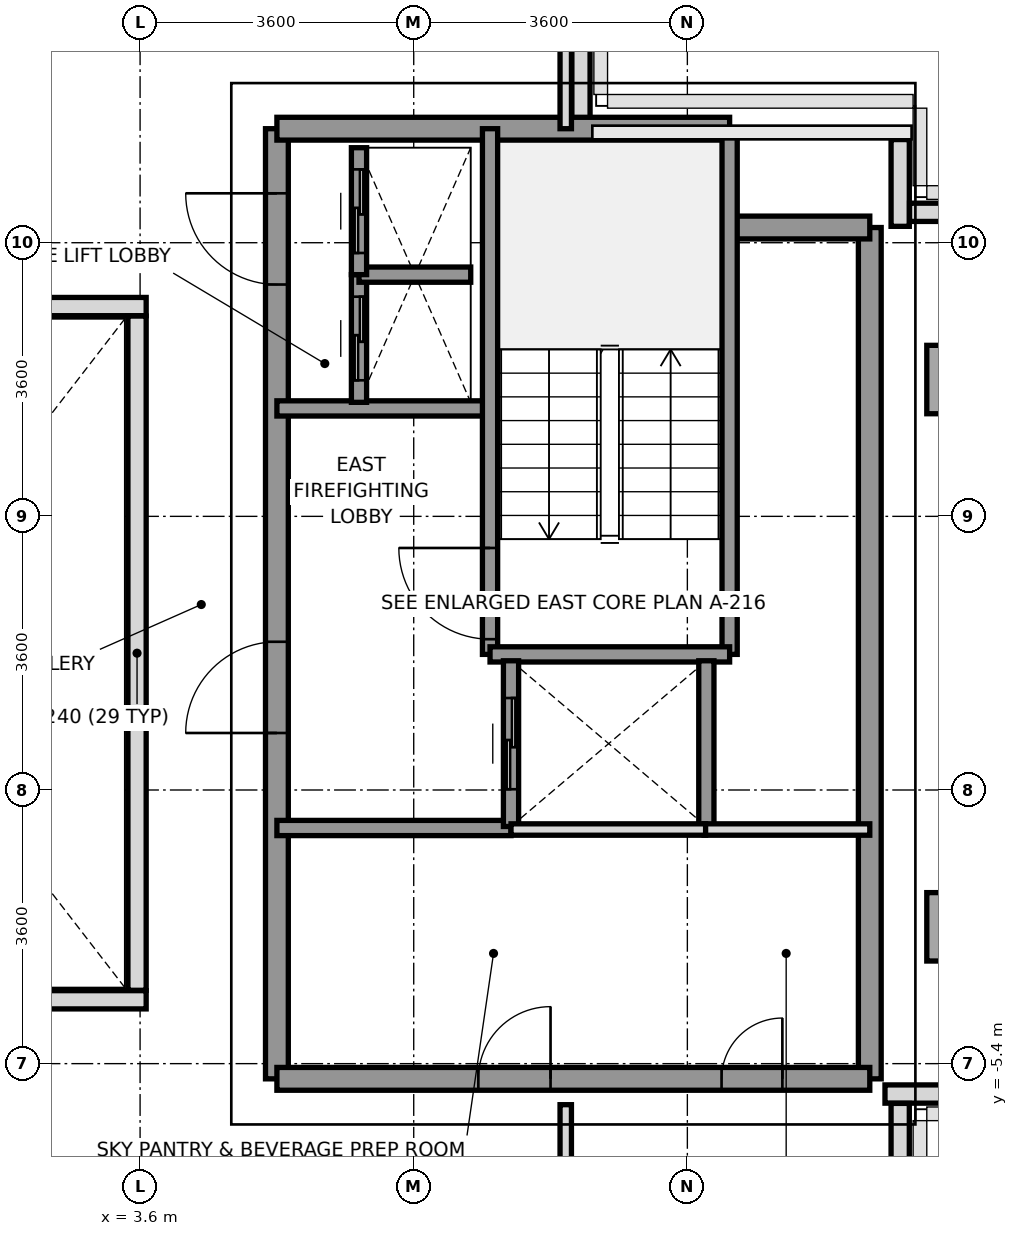
"""IFC4 building model, lengths in metres.
Left out: names, types, materials, properties, quantities, classifications, styles, units other than length and angle.
Written with IfcOpenShell. Run it as: python <this file> out.ifc"""

import sys

from ifc_helpers import new_model, si_unit, direction, frame, frame_2d, origin, origin_2d, place, context, subcontext, project, spatial, rectangle, extrude, source, transform, mapped, element, fill, save


model = new_model("IFC4")
c1 = context("Model", 3, precision=1e-05, world=origin(), true_north=direction((0.0, 1.0)))
c2 = subcontext(c1, "Body", "Model", "MODEL_VIEW")
j1 = project(units=[si_unit("LENGTHUNIT", "METRE"), si_unit("PLANEANGLEUNIT", "RADIAN")], contexts=[c1])
p1 = place(None, origin())
s1 = spatial("IfcSite", under=j1, at=p1, CompositionType="ELEMENT")
p2 = place(p1, origin())
s2 = spatial("IfcBuilding", under=s1, at=p2, CompositionType="ELEMENT")
p3 = place(p2, frame((0.0, 0.0, 255.6)))
s3 = spatial("IfcBuildingStorey", under=s2, at=p3, CompositionType="ELEMENT", Elevation=255.6)
m1 = source(origin(), c2, "Body", "SweptSolid", [
    extrude(rectangle(XDim=0.9, YDim=0.9, at=origin_2d()), origin(), (0.0, 0.0, 1.0), 3.01),
])
for number, where, z_axis, x_axis in (
    (1, (14.4, -3.6, 0.0), (0.0, 0.0, 1.0), (1.0, 0.0, 0.0)),
    (2, (14.4, 3.6, 0.0), (0.0, 0.0, 1.0), (1.0, 0.0, 0.0)),
):
    element("IfcColumn", number, at=place(p3, frame(where, z_axis=z_axis, x_axis=x_axis)), inside=s3, PredefinedType="COLUMN", context=c2, shape_type="MappedRepresentation", body=[
        mapped(m1, transform((0.0, 0.0, 0.0), x_axis=(1.0, 0.0, 0.0), y_axis=(0.0, 1.0, 0.0), z_axis=(0.0, 0.0, 1.0), scale=1.0)),
    ])
p4 = place(p3, frame((14.677, -5.8, 0.0), z_axis=(0.0, 0.0, 1.0), x_axis=(-1.0, 0.0, 0.0)))
e3 = element("IfcWall", 3, at=p4, inside=s3, PredefinedType="PARAPET", context=c2, shape_type="SweptSolid", body=[
    extrude(rectangle(XDim=1.277, YDim=0.24, at=frame_2d((0.639, 0.0))), origin(), (0.0, 0.0, 1.0), 1.15),
])
p5 = place(p3, frame((13.6, -5.923, 0.0), z_axis=(0.0, 0.0, 1.0), x_axis=(0.0, -1.0, 0.0)))
e4 = element("IfcWall", 4, at=p5, inside=s3, PredefinedType="PARAPET", context=c2, shape_type="SweptSolid", body=[
    extrude(rectangle(XDim=0.834, YDim=0.24, at=frame_2d((0.417, 0.0))), origin(), (0.0, 0.0, 1.0), 1.15),
])
p6 = place(p3, frame((9.4, 8.622, 0.0), z_axis=(0.0, 0.0, 1.0), x_axis=(0.0, -1.0, 0.0)))
e5 = element("IfcWall", 5, at=p6, inside=s3, PredefinedType="PARAPET", context=c2, shape_type="SweptSolid", body=[
    extrude(rectangle(XDim=1.669, YDim=0.24, at=frame_2d((0.834, 0.0))), origin(), (0.0, 0.0, 1.0), 1.15),
])
p7 = place(p3, frame((13.6, 6.757, 0.0), z_axis=(0.0, 0.0, 1.0), x_axis=(0.0, -1.0, 0.0)))
e6 = element("IfcWall", 6, at=p7, inside=s3, PredefinedType="PARAPET", context=c2, shape_type="SweptSolid", body=[
    extrude(rectangle(XDim=1.142, YDim=0.24, at=frame_2d((0.571, 0.0))), origin(), (0.0, 0.0, 1.0), 1.15),
])
p8 = place(p3, frame((13.723, 5.8, 0.0), z_axis=(0.0, 0.0, 1.0), x_axis=(1.0, 0.0, 0.0)))
e7 = element("IfcWall", 7, at=p8, inside=s3, PredefinedType="PARAPET", context=c2, shape_type="SweptSolid", body=[
    extrude(rectangle(XDim=1.077, YDim=0.24, at=frame_2d((0.539, 0.0))), origin(), (0.0, 0.0, 1.0), 1.15),
])
p9 = place(p3, frame((13.2, -5.6, 0.0), z_axis=(0.0, 0.0, 1.0), x_axis=(0.0, 1.0, 0.0)))
e8 = element("IfcWall", 8, at=p9, inside=s3, PredefinedType="SHEAR", context=c2, shape_type="SweptSolid", body=[
    extrude(rectangle(XDim=11.2, YDim=0.3, at=frame_2d((5.6, 0.0))), origin(), (0.0, 0.0, 1.0), 3.01),
])
p10 = place(p3, frame((5.4, -5.6, 0.0), z_axis=(0.0, 0.0, 1.0), x_axis=(0.0, 1.0, 0.0)))
e9 = element("IfcWall", 9, at=p10, inside=s3, PredefinedType="SHEAR", context=c2, shape_type="SweptSolid", body=[
    extrude(rectangle(XDim=12.5, YDim=0.3, at=frame_2d((6.25, 0.0))), origin(), (0.0, 0.0, 1.0), 3.01),
])
p11 = place(p10, frame((4.55, 0.0, 0.0)))
e10 = element("IfcOpeningElement", 10, at=p11, cuts=e9, PredefinedType="OPENING", context=c2, shape_type="SweptSolid", body=[
    extrude(rectangle(XDim=1.2, YDim=2.2, at=frame_2d((0.6, 1.1))), frame((0.0, 0.16, 0.0), z_axis=(0.0, -1.0, 0.0), x_axis=(1.0, 0.0, 0.0)), (0.0, 0.0, 1.0), 0.32),
])
p12 = place(p10, frame((10.45, 0.0, 0.0)))
e11 = element("IfcOpeningElement", 11, at=p12, cuts=e9, PredefinedType="OPENING", context=c2, shape_type="SweptSolid", body=[
    extrude(rectangle(XDim=1.2, YDim=2.2, at=frame_2d((0.6, 1.1))), frame((0.0, 0.16, 0.0), z_axis=(0.0, -1.0, 0.0), x_axis=(1.0, 0.0, 0.0)), (0.0, 0.0, 1.0), 0.32),
])
p13 = place(p3, frame((5.4, 6.9, 0.0), z_axis=(0.0, 0.0, 1.0), x_axis=(1.0, 0.0, 0.0)))
e12 = element("IfcWall", 12, at=p13, inside=s3, PredefinedType="SHEAR", context=c2, shape_type="SweptSolid", body=[
    extrude(rectangle(XDim=5.956, YDim=0.3, at=frame_2d((2.978, 0.0))), origin(), (0.0, 0.0, 1.0), 3.01),
])
p14 = place(p3, frame((11.356, 5.6, 0.0), z_axis=(0.0, 0.0, 1.0), x_axis=(1.0, 0.0, 0.0)))
e13 = element("IfcWall", 13, at=p14, inside=s3, PredefinedType="SHEAR", context=c2, shape_type="SweptSolid", body=[
    extrude(rectangle(XDim=1.844, YDim=0.3, at=frame_2d((0.922, 0.0))), origin(), (0.0, 0.0, 1.0), 3.01),
])
p15 = place(p3, frame((5.4, -5.6, 0.0), z_axis=(0.0, 0.0, 1.0), x_axis=(1.0, 0.0, 0.0)))
e14 = element("IfcWall", 14, at=p15, inside=s3, PredefinedType="SHEAR", context=c2, shape_type="SweptSolid", body=[
    extrude(rectangle(XDim=7.8, YDim=0.3, at=frame_2d((3.9, 0.0))), origin(), (0.0, 0.0, 1.0), 3.01),
])
p16 = place(p15, frame((5.85, 0.0, 0.0)))
e15 = element("IfcOpeningElement", 15, at=p16, cuts=e14, PredefinedType="OPENING", context=c2, shape_type="SweptSolid", body=[
    extrude(rectangle(XDim=0.8, YDim=2.1, at=frame_2d((0.4, 1.05))), frame((0.0, 0.16, 0.0), z_axis=(0.0, -1.0, 0.0), x_axis=(1.0, 0.0, 0.0)), (0.0, 0.0, 1.0), 0.32),
])
p17 = place(p15, frame((2.65, 0.0, 0.0)))
e16 = element("IfcOpeningElement", 16, at=p17, cuts=e14, PredefinedType="OPENING", context=c2, shape_type="SweptSolid", body=[
    extrude(rectangle(XDim=0.95, YDim=2.15, at=frame_2d((0.475, 1.075))), frame((0.0, 0.16, 0.0), z_axis=(0.0, -1.0, 0.0), x_axis=(1.0, 0.0, 0.0)), (0.0, 0.0, 1.0), 0.32),
])
p18 = place(p3, frame((5.4, 3.22, 0.0), z_axis=(0.0, 0.0, 1.0), x_axis=(1.0, 0.0, 0.0)))
e17 = element("IfcWall", 17, at=p18, inside=s3, PredefinedType="SOLIDWALL", context=c2, shape_type="SweptSolid", body=[
    extrude(rectangle(XDim=2.78, YDim=0.2, at=frame_2d((1.39, 0.0))), origin(), (0.0, 0.0, 1.0), 3.01),
])
p19 = place(p3, frame((5.4, -2.3, 0.0), z_axis=(0.0, 0.0, 1.0), x_axis=(1.0, 0.0, 0.0)))
e18 = element("IfcWall", 18, at=p19, inside=s3, PredefinedType="SOLIDWALL", context=c2, shape_type="SweptSolid", body=[
    extrude(rectangle(XDim=3.08, YDim=0.2, at=frame_2d((1.54, 0.0))), origin(), (0.0, 0.0, 1.0), 3.01),
])
p20 = place(p3, frame((8.204, -0.016, 0.0), z_axis=(0.0, 0.0, 1.0), x_axis=(0.0, 1.0, 0.0)))
e19 = element("IfcWall", 19, at=p20, inside=s3, PredefinedType="SOLIDWALL", context=c2, shape_type="SweptSolid", body=[
    extrude(rectangle(XDim=6.916, YDim=0.2, at=frame_2d((3.458, 0.0))), origin(), (0.0, 0.0, 1.0), 3.01),
])
p21 = place(p20, frame((0.2, 0.0, 0.0)))
e20 = element("IfcOpeningElement", 20, at=p21, cuts=e19, PredefinedType="OPENING", context=c2, shape_type="SweptSolid", body=[
    extrude(rectangle(XDim=1.2, YDim=2.2, at=frame_2d((0.6, 1.1))), frame((0.0, 0.11, 0.0), z_axis=(0.0, -1.0, 0.0), x_axis=(1.0, 0.0, 0.0)), (0.0, 0.0, 1.0), 0.22),
])
p22 = place(p3, frame((11.356, -0.016, 0.0), z_axis=(0.0, 0.0, 1.0), x_axis=(0.0, 1.0, 0.0)))
e21 = element("IfcWall", 21, at=p22, inside=s3, PredefinedType="SOLIDWALL", context=c2, shape_type="SweptSolid", body=[
    extrude(rectangle(XDim=6.916, YDim=0.2, at=frame_2d((3.458, 0.0))), origin(), (0.0, 0.0, 1.0), 3.01),
])
p23 = place(p3, frame((8.204, -0.016, 0.0), z_axis=(0.0, 0.0, 1.0), x_axis=(1.0, 0.0, 0.0)))
e22 = element("IfcWall", 22, at=p23, inside=s3, PredefinedType="SOLIDWALL", context=c2, shape_type="SweptSolid", body=[
    extrude(rectangle(XDim=3.152, YDim=0.2, at=frame_2d((1.576, 0.0))), origin(), (0.0, 0.0, 1.0), 3.01),
])
p24 = place(p3, frame((8.48, -2.28, 0.0), z_axis=(0.0, 0.0, 1.0), x_axis=(0.0, 1.0, 0.0)))
e23 = element("IfcWall", 23, at=p24, inside=s3, PredefinedType="SOLIDWALL", context=c2, shape_type="SweptSolid", body=[
    extrude(rectangle(XDim=2.18, YDim=0.2, at=frame_2d((1.09, 0.0))), origin(), (0.0, 0.0, 1.0), 3.01),
])
p25 = place(p24, frame((0.49, 0.0, 0.0)))
e24 = element("IfcOpeningElement", 24, at=p25, cuts=e23, PredefinedType="OPENING", context=c2, shape_type="SweptSolid", body=[
    extrude(rectangle(XDim=1.2, YDim=2.2, at=frame_2d((0.6, 1.1))), frame((0.0, 0.11, 0.0), z_axis=(0.0, -1.0, 0.0), x_axis=(1.0, 0.0, 0.0)), (0.0, 0.0, 1.0), 0.22),
])
p26 = place(p3, frame((11.05, -2.28, 0.0), z_axis=(0.0, 0.0, 1.0), x_axis=(0.0, 1.0, 0.0)))
e25 = element("IfcWall", 25, at=p26, inside=s3, PredefinedType="SOLIDWALL", context=c2, shape_type="SweptSolid", body=[
    extrude(rectangle(XDim=2.18, YDim=0.2, at=frame_2d((1.09, 0.0))), origin(), (0.0, 0.0, 1.0), 3.01),
])
p27 = place(p3, frame((6.48, 3.3, 0.0), z_axis=(0.0, 0.0, 1.0), x_axis=(0.0, 1.0, 0.0)))
e26 = element("IfcWall", 26, at=p27, inside=s3, PredefinedType="SOLIDWALL", context=c2, shape_type="SweptSolid", body=[
    extrude(rectangle(XDim=1.68, YDim=0.2, at=frame_2d((0.84, 0.0))), origin(), (0.0, 0.0, 1.0), 3.01),
])
p28 = place(p27, frame((0.29, 0.0, 0.0)))
e27 = element("IfcOpeningElement", 27, at=p28, cuts=e26, PredefinedType="OPENING", context=c2, shape_type="SweptSolid", body=[
    extrude(rectangle(XDim=1.1, YDim=2.2, at=frame_2d((0.55, 1.1))), frame((0.0, 0.11, 0.0), z_axis=(0.0, -1.0, 0.0), x_axis=(1.0, 0.0, 0.0)), (0.0, 0.0, 1.0), 0.22),
])
p29 = place(p3, frame((6.48, 4.98, 0.0), z_axis=(0.0, 0.0, 1.0), x_axis=(1.0, 0.0, 0.0)))
e28 = element("IfcWall", 28, at=p29, inside=s3, PredefinedType="SOLIDWALL", context=c2, shape_type="SweptSolid", body=[
    extrude(rectangle(XDim=1.47, YDim=0.2, at=frame_2d((0.735, 0.0))), origin(), (0.0, 0.0, 1.0), 3.01),
])
p30 = place(p3, frame((6.48, 4.98, 0.0), z_axis=(0.0, 0.0, 1.0), x_axis=(0.0, 1.0, 0.0)))
e29 = element("IfcWall", 29, at=p30, inside=s3, PredefinedType="SOLIDWALL", context=c2, shape_type="SweptSolid", body=[
    extrude(rectangle(XDim=1.67, YDim=0.2, at=frame_2d((0.835, 0.0))), origin(), (0.0, 0.0, 1.0), 3.01),
])
p31 = place(p30, frame((0.285, 0.0, 0.0)))
e30 = element("IfcOpeningElement", 30, at=p31, cuts=e29, PredefinedType="OPENING", context=c2, shape_type="SweptSolid", body=[
    extrude(rectangle(XDim=1.1, YDim=2.2, at=frame_2d((0.55, 1.1))), frame((0.0, 0.11, 0.0), z_axis=(0.0, -1.0, 0.0), x_axis=(1.0, 0.0, 0.0)), (0.0, 0.0, 1.0), 0.22),
])
p32 = place(p3, frame((11.02, -2.32, 0.0), z_axis=(0.0, 0.0, 1.0), x_axis=(1.0, 0.0, 0.0)))
e31 = element("IfcWall", 31, at=p32, inside=s3, PredefinedType="PARTITIONING", context=c2, shape_type="SweptSolid", body=[
    extrude(rectangle(XDim=2.18, YDim=0.15, at=frame_2d((1.09, 0.0))), origin(), (0.0, 0.0, 1.0), 3.01),
])
p33 = place(p3, frame((8.48, -2.32, 0.0), z_axis=(0.0, 0.0, 1.0), x_axis=(1.0, 0.0, 0.0)))
e32 = element("IfcWall", 32, at=p33, inside=s3, PredefinedType="PARTITIONING", context=c2, shape_type="SweptSolid", body=[
    extrude(rectangle(XDim=2.56, YDim=0.15, at=frame_2d((1.28, 0.0))), origin(), (0.0, 0.0, 1.0), 3.01),
])
p34 = place(p3, frame((9.2, 6.9, 0.0), z_axis=(0.0, 0.0, 1.0), x_axis=(0.0, 1.0, 0.0)))
e33 = element("IfcWall", 33, at=p34, inside=s3, PredefinedType="PARTITIONING", context=c2, shape_type="SweptSolid", body=[
    extrude(rectangle(XDim=3.38, YDim=0.15, at=frame_2d((1.69, 0.0))), origin(), (0.0, 0.0, 1.0), 2.61),
])
p35 = place(p3, frame((9.2, -10.28, 0.0), z_axis=(0.0, 0.0, 1.0), x_axis=(0.0, 1.0, 0.0)))
e34 = element("IfcWall", 34, at=p35, inside=s3, PredefinedType="PARTITIONING", context=c2, shape_type="SweptSolid", body=[
    extrude(rectangle(XDim=4.34, YDim=0.15, at=frame_2d((2.17, 0.0))), origin(), (0.0, 0.0, 1.0), 2.61),
])
for number, where, z_axis, x_axis in (
    (35, (-3.68, -4.56, 0.0), (0.0, 0.0, 1.0), (1.0, 0.0, 0.0)),
    (36, (-3.68, 4.56, 0.0), (0.0, 0.0, 1.0), (1.0, 0.0, 0.0)),
):
    element("IfcWall", number, at=place(p3, frame(where, z_axis=z_axis, x_axis=x_axis)), inside=s3, PredefinedType="PARAPET", context=c2, shape_type="SweptSolid", body=[
        extrude(rectangle(XDim=7.36, YDim=0.24, at=frame_2d((3.68, 0.0))), origin(), (0.0, 0.0, 1.0), 1.15),
    ])
p36 = place(p3, frame((3.56, -4.435, 0.0), z_axis=(0.0, 0.0, 1.0), x_axis=(0.0, 1.0, 0.0)))
e37 = element("IfcWall", 37, at=p36, inside=s3, PredefinedType="PARAPET", context=c2, shape_type="SweptSolid", body=[
    extrude(rectangle(XDim=8.87, YDim=0.24, at=frame_2d((4.435, 0.0))), origin(), (0.0, 0.0, 1.0), 1.15),
])
m2 = source(origin(), c2, "Body", "SweptSolid", [
    extrude(rectangle(XDim=1.2, YDim=2.2, at=frame_2d((0.6, 1.1))), frame((0.0, 0.025, 0.0), z_axis=(0.0, -1.0, 0.0), x_axis=(1.0, 0.0, 0.0)), (0.0, 0.0, 1.0), 0.05),
])
p37 = place(p21, origin())
e38 = element("IfcDoor", 38, at=p37, inside=s3, OperationType="SINGLE_SWING_RIGHT", PredefinedType="DOOR", context=c2, shape_type="MappedRepresentation", body=[
    mapped(m2, transform((0.0, 0.0, 0.0), x_axis=(1.0, 0.0, 0.0), y_axis=(0.0, 1.0, 0.0), z_axis=(0.0, 0.0, 1.0), scale=1.0)),
])
fill(e20, e38)
p38 = place(p11, origin())
e39 = element("IfcDoor", 39, at=p38, inside=s3, OperationType="SINGLE_SWING_LEFT", PredefinedType="DOOR", context=c2, shape_type="MappedRepresentation", body=[
    mapped(m2, transform((0.0, 0.0, 0.0), x_axis=(1.0, 0.0, 0.0), y_axis=(0.0, 1.0, 0.0), z_axis=(0.0, 0.0, 1.0), scale=1.0)),
])
fill(e10, e39)
p39 = place(p12, origin())
e40 = element("IfcDoor", 40, at=p39, inside=s3, OperationType="SINGLE_SWING_RIGHT", PredefinedType="DOOR", context=c2, shape_type="MappedRepresentation", body=[
    mapped(m2, transform((0.0, 0.0, 0.0), x_axis=(1.0, 0.0, 0.0), y_axis=(0.0, 1.0, 0.0), z_axis=(0.0, 0.0, 1.0), scale=1.0)),
])
fill(e11, e40)
m3 = source(origin(), c2, "Body", "SweptSolid", [
    extrude(rectangle(XDim=0.8, YDim=2.1, at=frame_2d((0.4, 1.05))), frame((0.0, 0.025, 0.0), z_axis=(0.0, -1.0, 0.0), x_axis=(1.0, 0.0, 0.0)), (0.0, 0.0, 1.0), 0.05),
])
p40 = place(p16, origin())
e41 = element("IfcDoor", 41, at=p40, inside=s3, OperationType="SINGLE_SWING_RIGHT", PredefinedType="DOOR", context=c2, shape_type="MappedRepresentation", body=[
    mapped(m3, transform((0.0, 0.0, 0.0), x_axis=(1.0, 0.0, 0.0), y_axis=(0.0, 1.0, 0.0), z_axis=(0.0, 0.0, 1.0), scale=1.0)),
])
fill(e15, e41)
m4 = source(origin(), c2, "Body", "SweptSolid", [
    extrude(rectangle(XDim=0.95, YDim=2.15, at=frame_2d((0.475, 1.075))), frame((0.0, 0.025, 0.0), z_axis=(0.0, -1.0, 0.0), x_axis=(1.0, 0.0, 0.0)), (0.0, 0.0, 1.0), 0.05),
])
p41 = place(p17, origin())
e42 = element("IfcDoor", 42, at=p41, inside=s3, OperationType="SINGLE_SWING_RIGHT", PredefinedType="DOOR", context=c2, shape_type="MappedRepresentation", body=[
    mapped(m4, transform((0.0, 0.0, 0.0), x_axis=(1.0, 0.0, 0.0), y_axis=(0.0, 1.0, 0.0), z_axis=(0.0, 0.0, 1.0), scale=1.0)),
])
fill(e16, e42)
p42 = place(p25, origin())
e43 = element("IfcDoor", 43, at=p42, inside=s3, OperationType="SLIDING_TO_RIGHT", PredefinedType="DOOR", context=c2, shape_type="MappedRepresentation", body=[
    mapped(m2, transform((0.0, 0.0, 0.0), x_axis=(1.0, 0.0, 0.0), y_axis=(0.0, 1.0, 0.0), z_axis=(0.0, 0.0, 1.0), scale=1.0)),
])
fill(e24, e43)
m5 = source(origin(), c2, "Body", "SweptSolid", [
    extrude(rectangle(XDim=1.1, YDim=2.2, at=frame_2d((0.55, 1.1))), frame((0.0, 0.025, 0.0), z_axis=(0.0, -1.0, 0.0), x_axis=(1.0, 0.0, 0.0)), (0.0, 0.0, 1.0), 0.05),
])
p43 = place(p28, origin())
e44 = element("IfcDoor", 44, at=p43, inside=s3, OperationType="SLIDING_TO_LEFT", PredefinedType="DOOR", context=c2, shape_type="MappedRepresentation", body=[
    mapped(m5, transform((0.0, 0.0, 0.0), x_axis=(1.0, 0.0, 0.0), y_axis=(0.0, 1.0, 0.0), z_axis=(0.0, 0.0, 1.0), scale=1.0)),
])
fill(e27, e44)
p44 = place(p31, origin())
e45 = element("IfcDoor", 45, at=p44, inside=s3, OperationType="SLIDING_TO_LEFT", PredefinedType="DOOR", context=c2, shape_type="MappedRepresentation", body=[
    mapped(m5, transform((0.0, 0.0, 0.0), x_axis=(1.0, 0.0, 0.0), y_axis=(0.0, 1.0, 0.0), z_axis=(0.0, 0.0, 1.0), scale=1.0)),
])
fill(e30, e45)
save(model, sys.argv[1])
